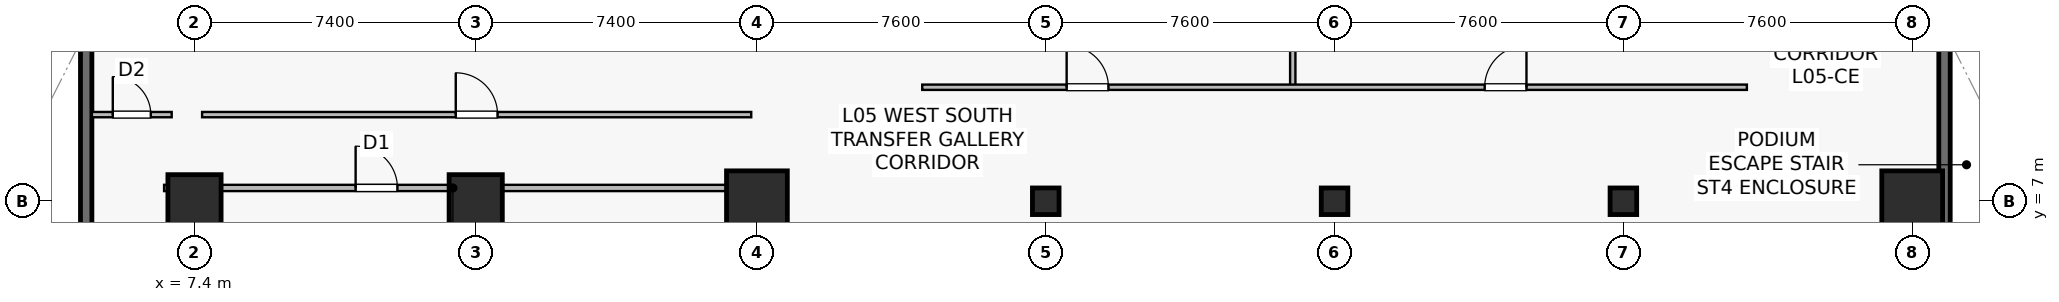
"""IFC4 building model, lengths in metres.
Left out: names, types, materials, properties, quantities, classifications, styles, units other than length and angle.
Written with IfcOpenShell. Run it as: python <this file> out.ifc"""

import sys

from ifc_helpers import new_model, si_unit, direction, frame, frame_2d, origin, origin_2d, place, context, subcontext, project, spatial, rectangle, hollow_rectangle, extrude, source, transform, mapped, element, fill, save


model = new_model("IFC4")
c1 = context("Model", 3, precision=1e-05, world=origin(), true_north=direction((0.0, 1.0)))
c2 = subcontext(c1, "Body", "Model", "MODEL_VIEW")
j1 = project(units=[si_unit("LENGTHUNIT", "METRE"), si_unit("PLANEANGLEUNIT", "RADIAN")], contexts=[c1])
p1 = place(None, origin())
s1 = spatial("IfcSite", under=j1, at=p1, CompositionType="ELEMENT")
p2 = place(p1, origin())
s2 = spatial("IfcBuilding", under=s1, at=p2, CompositionType="ELEMENT")
p3 = place(p2, frame((0.0, 0.0, 19.8)))
s3 = spatial("IfcBuildingStorey", under=s2, at=p3, CompositionType="ELEMENT", Elevation=19.8)
p4 = place(p3, frame((4.55, 3.2, 0.0), z_axis=(0.0, 0.0, 1.0), x_axis=(0.0, 1.0, 0.0)))
e1 = element("IfcWall", 1, at=p4, inside=s3, PredefinedType="SHEAR", context=c2, shape_type="SweptSolid", body=[
    extrude(rectangle(XDim=8.0, YDim=0.3, at=frame_2d((4.0, 0.0))), origin(), (0.0, 0.0, 1.0), 5.08),
])
p5 = place(p4, frame((0.25, 0.0, 0.0)))
e2 = element("IfcOpeningElement", 2, at=p5, cuts=e1, PredefinedType="OPENING", context=c2, shape_type="SweptSolid", body=[
    extrude(rectangle(XDim=1.1, YDim=2.15, at=frame_2d((0.55, 1.075))), frame((0.0, 0.16, 0.0), z_axis=(0.0, -1.0, 0.0), x_axis=(1.0, 0.0, 0.0)), (0.0, 0.0, 1.0), 0.32),
])
p6 = place(p3, frame((53.45, 3.2, 0.0), z_axis=(0.0, 0.0, 1.0), x_axis=(0.0, 1.0, 0.0)))
e3 = element("IfcWall", 3, at=p6, inside=s3, PredefinedType="SHEAR", context=c2, shape_type="SweptSolid", body=[
    extrude(rectangle(XDim=8.0, YDim=0.3, at=frame_2d((4.0, 0.0))), origin(), (0.0, 0.0, 1.0), 5.08),
])
m1 = source(origin(), c2, "Body", "SweptSolid", [
    extrude(rectangle(XDim=1.4, YDim=1.4, at=origin_2d()), origin(), (0.0, 0.0, 1.0), 5.4),
])
p7 = place(p3, frame((14.8, 7.0, 0.0), z_axis=(0.0, 0.0, 1.0), x_axis=(1.0, 0.0, 0.0)))
e4 = element("IfcColumn", 4, at=p7, inside=s3, PredefinedType="COLUMN", context=c2, shape_type="MappedRepresentation", body=[
    mapped(m1, transform((0.0, 0.0, 0.0), scale=1.0)),
])
m2 = source(origin(), c2, "Body", "SweptSolid", [
    extrude(rectangle(XDim=1.6, YDim=1.6, at=origin_2d()), origin(), (0.0, 0.0, 1.0), 5.4),
])
for number, where, z_axis, x_axis in (
    (5, (22.2, 7.0, 0.0), (0.0, 0.0, 1.0), (1.0, 0.0, 0.0)),
    (6, (52.6, 7.0, 0.0), (0.0, 0.0, 1.0), (1.0, 0.0, 0.0)),
):
    element("IfcColumn", number, at=place(p3, frame(where, z_axis=z_axis, x_axis=x_axis)), inside=s3, PredefinedType="COLUMN", context=c2, shape_type="MappedRepresentation", body=[
        mapped(m2, transform((0.0, 0.0, 0.0), scale=1.0)),
    ])
p8 = place(p3, frame((7.4, 7.0, 0.0), z_axis=(0.0, 0.0, 1.0), x_axis=(1.0, 0.0, 0.0)))
e7 = element("IfcColumn", 7, at=p8, inside=s3, PredefinedType="COLUMN", context=c2, shape_type="MappedRepresentation", body=[
    mapped(m1, transform((0.0, 0.0, 0.0), scale=1.0)),
])
m3 = source(origin(), c2, "Body", "SweptSolid", [
    extrude(hollow_rectangle(XDim=0.7, YDim=0.7, WallThickness=0.032, at=origin_2d()), origin(), (0.0, 0.0, 1.0), 5.4),
])
for number, where, z_axis, x_axis in (
    (8, (29.8, 7.0, 0.0), (0.0, 0.0, 1.0), (1.0, 0.0, 0.0)),
    (9, (37.4, 7.0, 0.0), (0.0, 0.0, 1.0), (1.0, 0.0, 0.0)),
    (10, (45.0, 7.0, 0.0), (0.0, 0.0, 1.0), (1.0, 0.0, 0.0)),
):
    element("IfcColumn", number, at=place(p3, frame(where, z_axis=z_axis, x_axis=x_axis)), inside=s3, PredefinedType="COLUMN", context=c2, shape_type="MappedRepresentation", body=[
        mapped(m3, transform((0.0, 0.0, 0.0), scale=1.0)),
    ])
p9 = place(p3, frame((6.6, 7.35, 0.0), z_axis=(0.0, 0.0, 1.0), x_axis=(1.0, 0.0, 0.0)))
e11 = element("IfcWall", 11, at=p9, inside=s3, PredefinedType="PARTITIONING", context=c2, shape_type="SweptSolid", body=[
    extrude(rectangle(XDim=15.2, YDim=0.165, at=frame_2d((7.6, 0.0))), origin(), (0.0, 0.0, 1.0), 4.365),
])
p10 = place(p9, frame((5.04, 0.0, 0.0)))
e12 = element("IfcOpeningElement", 12, at=p10, cuts=e11, PredefinedType="OPENING", context=c2, shape_type="SweptSolid", body=[
    extrude(rectangle(XDim=1.1, YDim=2.18, at=frame_2d((0.55, 1.09))), frame((0.0, 0.093, 0.0), z_axis=(0.0, -1.0, 0.0), x_axis=(1.0, 0.0, 0.0)), (0.0, 0.0, 1.0), 0.185),
])
for number, where, z_axis, x_axis in (
    (13, (22.1, -0.68, 0.0), (0.0, 0.0, 1.0), (0.0, 1.0, 0.0)),
    (14, (52.7, -0.68, 0.0), (0.0, 0.0, 1.0), (0.0, 1.0, 0.0)),
):
    element("IfcWall", number, at=place(p3, frame(where, z_axis=z_axis, x_axis=x_axis)), inside=s3, PredefinedType="PARTITIONING", context=c2, shape_type="SweptSolid", body=[
        extrude(rectangle(XDim=8.03, YDim=0.165, at=frame_2d((4.015, 0.0))), origin(), (0.0, 0.0, 1.0), 4.165),
    ])
p11 = place(p3, frame((36.3, 10.0, 0.0), z_axis=(0.0, 0.0, 1.0), x_axis=(0.0, 1.0, 0.0)))
e15 = element("IfcWall", 15, at=p11, inside=s3, PredefinedType="PARTITIONING", context=c2, shape_type="SweptSolid", body=[
    extrude(rectangle(XDim=4.6, YDim=0.14, at=frame_2d((2.3, 0.0))), origin(), (0.0, 0.0, 1.0), 4.165),
])
p12 = place(p3, frame((26.55, 10.0, 0.0), z_axis=(0.0, 0.0, 1.0), x_axis=(1.0, 0.0, 0.0)))
e16 = element("IfcWall", 16, at=p12, inside=s3, PredefinedType="PARTITIONING", context=c2, shape_type="SweptSolid", body=[
    extrude(rectangle(XDim=21.7, YDim=0.14, at=frame_2d((10.85, 0.0))), origin(), (0.0, 0.0, 1.0), 4.365),
])
p13 = place(p12, frame((3.8, 0.0, 0.0)))
e17 = element("IfcOpeningElement", 17, at=p13, cuts=e16, PredefinedType="OPENING", context=c2, shape_type="SweptSolid", body=[
    extrude(rectangle(XDim=1.1, YDim=2.18, at=frame_2d((0.55, 1.09))), frame((0.0, 0.08, 0.0), z_axis=(0.0, -1.0, 0.0), x_axis=(1.0, 0.0, 0.0)), (0.0, 0.0, 1.0), 0.16),
])
p14 = place(p12, frame((14.8, 0.0, 0.0)))
e18 = element("IfcOpeningElement", 18, at=p14, cuts=e16, PredefinedType="OPENING", context=c2, shape_type="SweptSolid", body=[
    extrude(rectangle(XDim=1.1, YDim=2.18, at=frame_2d((0.55, 1.09))), frame((0.0, 0.08, 0.0), z_axis=(0.0, -1.0, 0.0), x_axis=(1.0, 0.0, 0.0)), (0.0, 0.0, 1.0), 0.16),
])
p15 = place(p3, frame((7.6, 9.28, 0.0), z_axis=(0.0, 0.0, 1.0), x_axis=(1.0, 0.0, 0.0)))
e19 = element("IfcWall", 19, at=p15, inside=s3, PredefinedType="PARTITIONING", context=c2, shape_type="SweptSolid", body=[
    extrude(rectangle(XDim=14.45, YDim=0.14, at=frame_2d((7.225, 0.0))), origin(), (0.0, 0.0, 1.0), 4.365),
])
p16 = place(p15, frame((6.675, 0.0, 0.0)))
e20 = element("IfcOpeningElement", 20, at=p16, cuts=e19, PredefinedType="OPENING", context=c2, shape_type="SweptSolid", body=[
    extrude(rectangle(XDim=1.1, YDim=2.18, at=frame_2d((0.55, 1.09))), frame((0.0, 0.08, 0.0), z_axis=(0.0, -1.0, 0.0), x_axis=(1.0, 0.0, 0.0)), (0.0, 0.0, 1.0), 0.16),
])
p17 = place(p3, frame((4.7, 9.28, 0.0), z_axis=(0.0, 0.0, 1.0), x_axis=(1.0, 0.0, 0.0)))
e21 = element("IfcWall", 21, at=p17, inside=s3, PredefinedType="PARTITIONING", context=c2, shape_type="SweptSolid", body=[
    extrude(rectangle(XDim=2.1, YDim=0.14, at=frame_2d((1.05, 0.0))), origin(), (0.0, 0.0, 1.0), 5.08),
])
p18 = place(p17, frame((0.55, 0.0, 0.0)))
e22 = element("IfcOpeningElement", 22, at=p18, cuts=e21, PredefinedType="OPENING", context=c2, shape_type="SweptSolid", body=[
    extrude(rectangle(XDim=1.0, YDim=2.15, at=frame_2d((0.5, 1.075))), frame((0.0, 0.08, 0.0), z_axis=(0.0, -1.0, 0.0), x_axis=(1.0, 0.0, 0.0)), (0.0, 0.0, 1.0), 0.16),
])
m4 = source(origin(), c2, "Body", "SweptSolid", [
    extrude(rectangle(XDim=1.1, YDim=2.18, at=frame_2d((0.55, 1.09))), frame((0.0, 0.025, 0.0), z_axis=(0.0, -1.0, 0.0), x_axis=(1.0, 0.0, 0.0)), (0.0, 0.0, 1.0), 0.05),
])
p19 = place(p10, origin())
e23 = element("IfcDoor", 23, at=p19, inside=s3, OperationType="SINGLE_SWING_LEFT", PredefinedType="DOOR", context=c2, shape_type="MappedRepresentation", body=[
    mapped(m4, transform((0.0, 0.0, 0.0), scale=1.0)),
])
fill(e12, e23)
p20 = place(p13, origin())
e24 = element("IfcDoor", 24, at=p20, inside=s3, OperationType="SINGLE_SWING_LEFT", PredefinedType="DOOR", context=c2, shape_type="MappedRepresentation", body=[
    mapped(m4, transform((0.0, 0.0, 0.0), scale=1.0)),
])
fill(e17, e24)
p21 = place(p14, origin())
e25 = element("IfcDoor", 25, at=p21, inside=s3, OperationType="SINGLE_SWING_RIGHT", PredefinedType="DOOR", context=c2, shape_type="MappedRepresentation", body=[
    mapped(m4, transform((0.0, 0.0, 0.0), scale=1.0)),
])
fill(e18, e25)
p22 = place(p16, origin())
e26 = element("IfcDoor", 26, at=p22, inside=s3, OperationType="SINGLE_SWING_LEFT", PredefinedType="DOOR", context=c2, shape_type="MappedRepresentation", body=[
    mapped(m4, transform((0.0, 0.0, 0.0), scale=1.0)),
])
fill(e20, e26)
m5 = source(origin(), c2, "Body", "SweptSolid", [
    extrude(rectangle(XDim=1.0, YDim=2.15, at=frame_2d((0.5, 1.075))), frame((0.0, 0.025, 0.0), z_axis=(0.0, -1.0, 0.0), x_axis=(1.0, 0.0, 0.0)), (0.0, 0.0, 1.0), 0.05),
])
p23 = place(p18, origin())
e27 = element("IfcDoor", 27, at=p23, inside=s3, OperationType="SINGLE_SWING_LEFT", PredefinedType="DOOR", context=c2, shape_type="MappedRepresentation", body=[
    mapped(m5, transform((0.0, 0.0, 0.0), scale=1.0)),
])
fill(e22, e27)
save(model, sys.argv[1])
